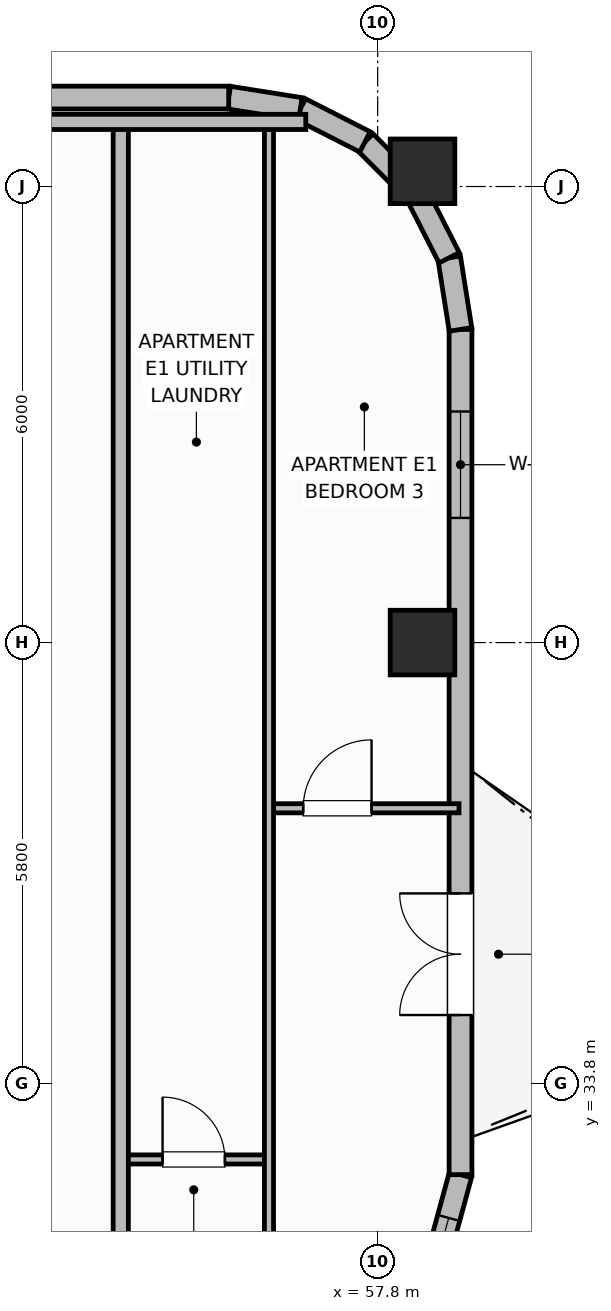
"""IFC4 building model, lengths in metres.
Left out: names, types, materials, properties, quantities, classifications, styles, units other than length and angle.
Written with IfcOpenShell. Run it as: python <this file> out.ifc"""

import sys

from ifc_helpers import new_model, si_unit, direction, frame, frame_2d, origin, origin_2d, place, context, subcontext, project, spatial, rectangle, extrude, element, fill, save


model = new_model("IFC4")
c1 = context("Model", 3, precision=1e-05, world=origin(), true_north=direction((0.0, 1.0)))
c2 = subcontext(c1, "Body", "Model", "MODEL_VIEW")
j1 = project(units=[si_unit("LENGTHUNIT", "METRE"), si_unit("PLANEANGLEUNIT", "RADIAN")], contexts=[c1])
p1 = place(None, origin())
s1 = spatial("IfcSite", under=j1, at=p1, CompositionType="ELEMENT")
p2 = place(p1, origin())
s2 = spatial("IfcBuilding", under=s1, at=p2, CompositionType="ELEMENT")
p3 = place(p2, frame((0.0, 0.0, 251.7)))
s3 = spatial("IfcBuildingStorey", under=s2, at=p3, CompositionType="ELEMENT", Elevation=251.7)
for number, where, z_axis, x_axis in (
    (1, (58.39, 39.6, 0.0), (0.0, 0.0, 1.0), (1.0, 0.0, 0.0)),
    (2, (58.39, 45.8, 0.0), (0.0, 0.0, 1.0), (1.0, 0.0, 0.0)),
):
    element("IfcColumn", number, at=place(p3, frame(where, z_axis=z_axis, x_axis=x_axis)), inside=s3, PredefinedType="COLUMN", context=c2, shape_type="SweptSolid", body=[
        extrude(rectangle(XDim=0.85, YDim=0.85, at=origin_2d()), origin(), (0.0, 0.0, 1.0), 3.7),
    ])
p4 = place(p3, frame((58.29, 30.4, 0.0), z_axis=(0.0, 0.0, 1.0), x_axis=(0.263035877812, 0.96478605244, 0.0)))
e3 = element("IfcWall", 3, at=p4, inside=s3, PredefinedType="SOLIDWALL", context=c2, shape_type="SweptSolid", body=[
    extrude(rectangle(XDim=2.281, YDim=0.3, at=frame_2d((1.14, 0.0))), origin(), (0.0, 0.0, 1.0), 2.73),
])
p5 = place(p4, frame((0.59, 0.0, 0.92)))
e4 = element("IfcOpeningElement", 4, at=p5, cuts=e3, PredefinedType="OPENING", context=c2, shape_type="SweptSolid", body=[
    extrude(rectangle(XDim=1.1, YDim=1.65, at=frame_2d((0.55, 0.825))), frame((0.0, 0.16, 0.0), z_axis=(0.0, -1.0, 0.0), x_axis=(1.0, 0.0, 0.0)), (0.0, 0.0, 1.0), 0.32),
])
p6 = place(p3, frame((58.89, 32.6, 0.0), z_axis=(0.0, 0.0, 1.0), x_axis=(0.0, 1.0, 0.0)))
e5 = element("IfcWall", 5, at=p6, inside=s3, PredefinedType="SOLIDWALL", context=c2, shape_type="SweptSolid", body=[
    extrude(rectangle(XDim=11.12, YDim=0.3, at=frame_2d((5.56, 0.0))), origin(), (0.0, 0.0, 1.0), 2.73),
])
p7 = place(p6, frame((2.1, 0.0, 0.0)))
e6 = element("IfcOpeningElement", 6, at=p7, cuts=e5, PredefinedType="OPENING", context=c2, shape_type="SweptSolid", body=[
    extrude(rectangle(XDim=1.6, YDim=2.1, at=frame_2d((0.8, 1.05))), frame((0.0, 0.16, 0.0), z_axis=(0.0, -1.0, 0.0), x_axis=(1.0, 0.0, 0.0)), (0.0, 0.0, 1.0), 0.32),
])
p8 = place(p6, frame((8.64, 0.0, 0.72)))
e7 = element("IfcOpeningElement", 7, at=p8, cuts=e5, PredefinedType="OPENING", context=c2, shape_type="SweptSolid", body=[
    extrude(rectangle(XDim=1.4, YDim=1.85, at=frame_2d((0.7, 0.925))), frame((0.0, 0.16, 0.0), z_axis=(0.0, -1.0, 0.0), x_axis=(1.0, 0.0, 0.0)), (0.0, 0.0, 1.0), 0.32),
])
p9 = place(p3, frame((58.89, 43.72, 0.0), z_axis=(0.0, 0.0, 1.0), x_axis=(-0.156304114255, 0.987708977314, 0.0)))
e8 = element("IfcWall", 8, at=p9, inside=s3, PredefinedType="SOLIDWALL", context=c2, shape_type="SweptSolid", body=[
    extrude(rectangle(XDim=0.954, YDim=0.3, at=frame_2d((0.477, 0.0))), origin(), (0.0, 0.0, 1.0), 2.73),
])
p10 = place(p3, frame((58.741, 44.663, 0.0), z_axis=(0.0, 0.0, 1.0), x_axis=(-0.45395644796, 0.891023873617, 0.0)))
e9 = element("IfcWall", 9, at=p10, inside=s3, PredefinedType="SOLIDWALL", context=c2, shape_type="SweptSolid", body=[
    extrude(rectangle(XDim=0.954, YDim=0.3, at=frame_2d((0.477, 0.0))), origin(), (0.0, 0.0, 1.0), 2.73),
])
for number, where, z_axis, x_axis in (
    (10, (58.308, 45.513, 0.0), (0.0, 0.0, 1.0), (-0.707, 0.707, 0.0)),
    (11, (57.633, 46.188, 0.0), (0.0, 0.0, 1.0), (-0.891, 0.454, 0.0)),
):
    element("IfcWall", number, at=place(p3, frame(where, z_axis=z_axis, x_axis=x_axis)), inside=s3, PredefinedType="SOLIDWALL", context=c2, shape_type="SweptSolid", body=[
        extrude(rectangle(XDim=0.954, YDim=0.3, at=frame_2d((0.477, 0.0))), origin(), (0.0, 0.0, 1.0), 2.73),
    ])
p11 = place(p3, frame((56.782, 46.621, 0.0), z_axis=(0.0, 0.0, 1.0), x_axis=(-0.987663181641, 0.156593229835, 0.0)))
e12 = element("IfcWall", 12, at=p11, inside=s3, PredefinedType="SOLIDWALL", context=c2, shape_type="SweptSolid", body=[
    extrude(rectangle(XDim=0.954, YDim=0.3, at=frame_2d((0.477, 0.0))), origin(), (0.0, 0.0, 1.0), 2.73),
])
p12 = place(p3, frame((55.84, 46.77, 0.0), z_axis=(0.0, 0.0, 1.0), x_axis=(-1.0, 0.0, 0.0)))
e13 = element("IfcWall", 13, at=p12, inside=s3, PredefinedType="SOLIDWALL", context=c2, shape_type="SweptSolid", body=[
    extrude(rectangle(XDim=33.28, YDim=0.3, at=frame_2d((16.64, 0.0))), origin(), (0.0, 0.0, 1.0), 2.73),
])
p13 = place(p12, frame((4.647, 0.0, 0.71)))
e14 = element("IfcOpeningElement", 14, at=p13, cuts=e13, PredefinedType="OPENING", context=c2, shape_type="SweptSolid", body=[
    extrude(rectangle(XDim=1.6, YDim=1.9, at=frame_2d((0.8, 0.95))), frame((0.0, 0.16, 0.0), z_axis=(0.0, -1.0, 0.0), x_axis=(1.0, 0.0, 0.0)), (0.0, 0.0, 1.0), 0.32),
])
p14 = place(p12, frame((7.845, 0.0, 0.71)))
e15 = element("IfcOpeningElement", 15, at=p14, cuts=e13, PredefinedType="OPENING", context=c2, shape_type="SweptSolid", body=[
    extrude(rectangle(XDim=1.6, YDim=1.9, at=frame_2d((0.8, 0.95))), frame((0.0, 0.16, 0.0), z_axis=(0.0, -1.0, 0.0), x_axis=(1.0, 0.0, 0.0)), (0.0, 0.0, 1.0), 0.32),
])
p15 = place(p12, frame((14.241, 0.0, 0.71)))
e16 = element("IfcOpeningElement", 16, at=p15, cuts=e13, PredefinedType="OPENING", context=c2, shape_type="SweptSolid", body=[
    extrude(rectangle(XDim=1.6, YDim=1.9, at=frame_2d((0.8, 0.95))), frame((0.0, 0.16, 0.0), z_axis=(0.0, -1.0, 0.0), x_axis=(1.0, 0.0, 0.0)), (0.0, 0.0, 1.0), 0.32),
])
p16 = place(p12, frame((17.439, 0.0, 0.71)))
e17 = element("IfcOpeningElement", 17, at=p16, cuts=e13, PredefinedType="OPENING", context=c2, shape_type="SweptSolid", body=[
    extrude(rectangle(XDim=1.6, YDim=1.9, at=frame_2d((0.8, 0.95))), frame((0.0, 0.16, 0.0), z_axis=(0.0, -1.0, 0.0), x_axis=(1.0, 0.0, 0.0)), (0.0, 0.0, 1.0), 0.32),
])
p17 = place(p12, frame((23.835, 0.0, 0.71)))
e18 = element("IfcOpeningElement", 18, at=p17, cuts=e13, PredefinedType="OPENING", context=c2, shape_type="SweptSolid", body=[
    extrude(rectangle(XDim=1.6, YDim=1.9, at=frame_2d((0.8, 0.95))), frame((0.0, 0.16, 0.0), z_axis=(0.0, -1.0, 0.0), x_axis=(1.0, 0.0, 0.0)), (0.0, 0.0, 1.0), 0.32),
])
p18 = place(p12, frame((27.033, 0.0, 0.71)))
e19 = element("IfcOpeningElement", 19, at=p18, cuts=e13, PredefinedType="OPENING", context=c2, shape_type="SweptSolid", body=[
    extrude(rectangle(XDim=1.6, YDim=1.9, at=frame_2d((0.8, 0.95))), frame((0.0, 0.16, 0.0), z_axis=(0.0, -1.0, 0.0), x_axis=(1.0, 0.0, 0.0)), (0.0, 0.0, 1.0), 0.32),
])
p19 = place(p3, frame((54.42, 32.8, 0.0), z_axis=(0.0, 0.0, 1.0), x_axis=(1.0, 0.0, 0.0)))
e20 = element("IfcWall", 20, at=p19, inside=s3, PredefinedType="PARTITIONING", context=c2, shape_type="SweptSolid", body=[
    extrude(rectangle(XDim=1.95, YDim=0.12, at=frame_2d((0.975, 0.0))), origin(), (0.0, 0.0, 1.0), 2.56),
])
p20 = place(p19, frame((0.55, 0.0, 0.0)))
e21 = element("IfcOpeningElement", 21, at=p20, cuts=e20, PredefinedType="OPENING", context=c2, shape_type="SweptSolid", body=[
    extrude(rectangle(XDim=0.82, YDim=2.08, at=frame_2d((0.41, 1.04))), frame((0.0, 0.07, 0.0), z_axis=(0.0, -1.0, 0.0), x_axis=(1.0, 0.0, 0.0)), (0.0, 0.0, 1.0), 0.14),
])
p21 = place(p3, frame((56.37, 37.42, 0.0), z_axis=(0.0, 0.0, 1.0), x_axis=(1.0, 0.0, 0.0)))
e22 = element("IfcWall", 22, at=p21, inside=s3, PredefinedType="PARTITIONING", context=c2, shape_type="SweptSolid", body=[
    extrude(rectangle(XDim=2.5, YDim=0.12, at=frame_2d((1.25, 0.0))), origin(), (0.0, 0.0, 1.0), 2.56),
])
p22 = place(p21, frame((0.45, 0.0, 0.0)))
e23 = element("IfcOpeningElement", 23, at=p22, cuts=e22, PredefinedType="OPENING", context=c2, shape_type="SweptSolid", body=[
    extrude(rectangle(XDim=0.9, YDim=2.1, at=frame_2d((0.45, 1.05))), frame((0.0, 0.07, 0.0), z_axis=(0.0, -1.0, 0.0), x_axis=(1.0, 0.0, 0.0)), (0.0, 0.0, 1.0), 0.14),
])
p23 = place(p3, frame((56.37, 9.99, 0.0), z_axis=(0.0, 0.0, 1.0), x_axis=(0.0, 1.0, 0.0)))
e24 = element("IfcWall", 24, at=p23, inside=s3, PredefinedType="PARTITIONING", context=c2, shape_type="SweptSolid", body=[
    extrude(rectangle(XDim=36.42, YDim=0.12, at=frame_2d((18.21, 0.0))), origin(), (0.0, 0.0, 1.0), 2.56),
])
p24 = place(p23, frame((0.41, 0.0, 0.0)))
e25 = element("IfcOpeningElement", 25, at=p24, cuts=e24, PredefinedType="OPENING", context=c2, shape_type="SweptSolid", body=[
    extrude(rectangle(XDim=0.9, YDim=2.1, at=frame_2d((0.45, 1.05))), frame((0.0, 0.07, 0.0), z_axis=(0.0, -1.0, 0.0), x_axis=(1.0, 0.0, 0.0)), (0.0, 0.0, 1.0), 0.14),
])
p25 = place(p23, frame((15.56, 0.0, 0.0)))
e26 = element("IfcOpeningElement", 26, at=p25, cuts=e24, PredefinedType="OPENING", context=c2, shape_type="SweptSolid", body=[
    extrude(rectangle(XDim=0.82, YDim=2.08, at=frame_2d((0.41, 1.04))), frame((0.0, 0.07, 0.0), z_axis=(0.0, -1.0, 0.0), x_axis=(1.0, 0.0, 0.0)), (0.0, 0.0, 1.0), 0.14),
])
p26 = place(p3, frame((54.42, 9.95, 0.0), z_axis=(0.0, 0.0, 1.0), x_axis=(0.0, 1.0, 0.0)))
e27 = element("IfcWall", 27, at=p26, inside=s3, PredefinedType="PARTITIONING", context=c2, shape_type="SweptSolid", body=[
    extrude(rectangle(XDim=36.5, YDim=0.2, at=frame_2d((18.25, 0.0))), origin(), (0.0, 0.0, 1.0), 2.56),
])
p27 = place(p26, frame((3.25, 0.0, 0.0)))
e28 = element("IfcOpeningElement", 28, at=p27, cuts=e27, PredefinedType="OPENING", context=c2, shape_type="SweptSolid", body=[
    extrude(rectangle(XDim=1.0, YDim=2.15, at=frame_2d((0.5, 1.075))), frame((0.0, 0.11, 0.0), z_axis=(0.0, -1.0, 0.0), x_axis=(1.0, 0.0, 0.0)), (0.0, 0.0, 1.0), 0.22),
])
p28 = place(p3, frame((53.1, 46.45, 0.0), z_axis=(0.0, 0.0, 1.0), x_axis=(1.0, 0.0, 0.0)))
e29 = element("IfcWall", 29, at=p28, inside=s3, PredefinedType="PARTITIONING", context=c2, shape_type="SweptSolid", body=[
    extrude(rectangle(XDim=3.754, YDim=0.2, at=frame_2d((1.877, 0.0))), origin(), (0.0, 0.0, 1.0), 2.56),
])
p29 = place(p5, origin())
e30 = element("IfcWindow", 30, at=p29, inside=s3, PartitioningType="SINGLE_PANEL", PredefinedType="WINDOW", context=c2, shape_type="SweptSolid", body=[
    extrude(rectangle(XDim=1.1, YDim=1.65, at=frame_2d((0.55, 0.825))), frame((0.0, 0.03, 0.0), z_axis=(0.0, -1.0, 0.0), x_axis=(1.0, 0.0, 0.0)), (0.0, 0.0, 1.0), 0.06),
])
fill(e4, e30)
p30 = place(p7, origin())
e31 = element("IfcDoor", 31, at=p30, inside=s3, OperationType="DOUBLE_DOOR_SINGLE_SWING", PredefinedType="DOOR", context=c2, shape_type="SweptSolid", body=[
    extrude(rectangle(XDim=1.6, YDim=2.1, at=frame_2d((0.8, 1.05))), frame((0.0, 0.025, 0.0), z_axis=(0.0, -1.0, 0.0), x_axis=(1.0, 0.0, 0.0)), (0.0, 0.0, 1.0), 0.05),
])
fill(e6, e31)
p31 = place(p8, origin())
e32 = element("IfcWindow", 32, at=p31, inside=s3, PartitioningType="SINGLE_PANEL", PredefinedType="WINDOW", context=c2, shape_type="SweptSolid", body=[
    extrude(rectangle(XDim=1.4, YDim=1.85, at=frame_2d((0.7, 0.925))), frame((0.0, 0.03, 0.0), z_axis=(0.0, -1.0, 0.0), x_axis=(1.0, 0.0, 0.0)), (0.0, 0.0, 1.0), 0.06),
])
fill(e7, e32)
p32 = place(p20, origin())
e33 = element("IfcDoor", 33, at=p32, inside=s3, OperationType="SINGLE_SWING_LEFT", PredefinedType="DOOR", context=c2, shape_type="SweptSolid", body=[
    extrude(rectangle(XDim=0.82, YDim=2.08, at=frame_2d((0.41, 1.04))), frame((0.0, 0.025, 0.0), z_axis=(0.0, -1.0, 0.0), x_axis=(1.0, 0.0, 0.0)), (0.0, 0.0, 1.0), 0.05),
])
fill(e21, e33)
p33 = place(p22, origin())
e34 = element("IfcDoor", 34, at=p33, inside=s3, OperationType="SINGLE_SWING_RIGHT", PredefinedType="DOOR", context=c2, shape_type="SweptSolid", body=[
    extrude(rectangle(XDim=0.9, YDim=2.1, at=frame_2d((0.45, 1.05))), frame((0.0, 0.025, 0.0), z_axis=(0.0, -1.0, 0.0), x_axis=(1.0, 0.0, 0.0)), (0.0, 0.0, 1.0), 0.05),
])
fill(e23, e34)
save(model, sys.argv[1])
